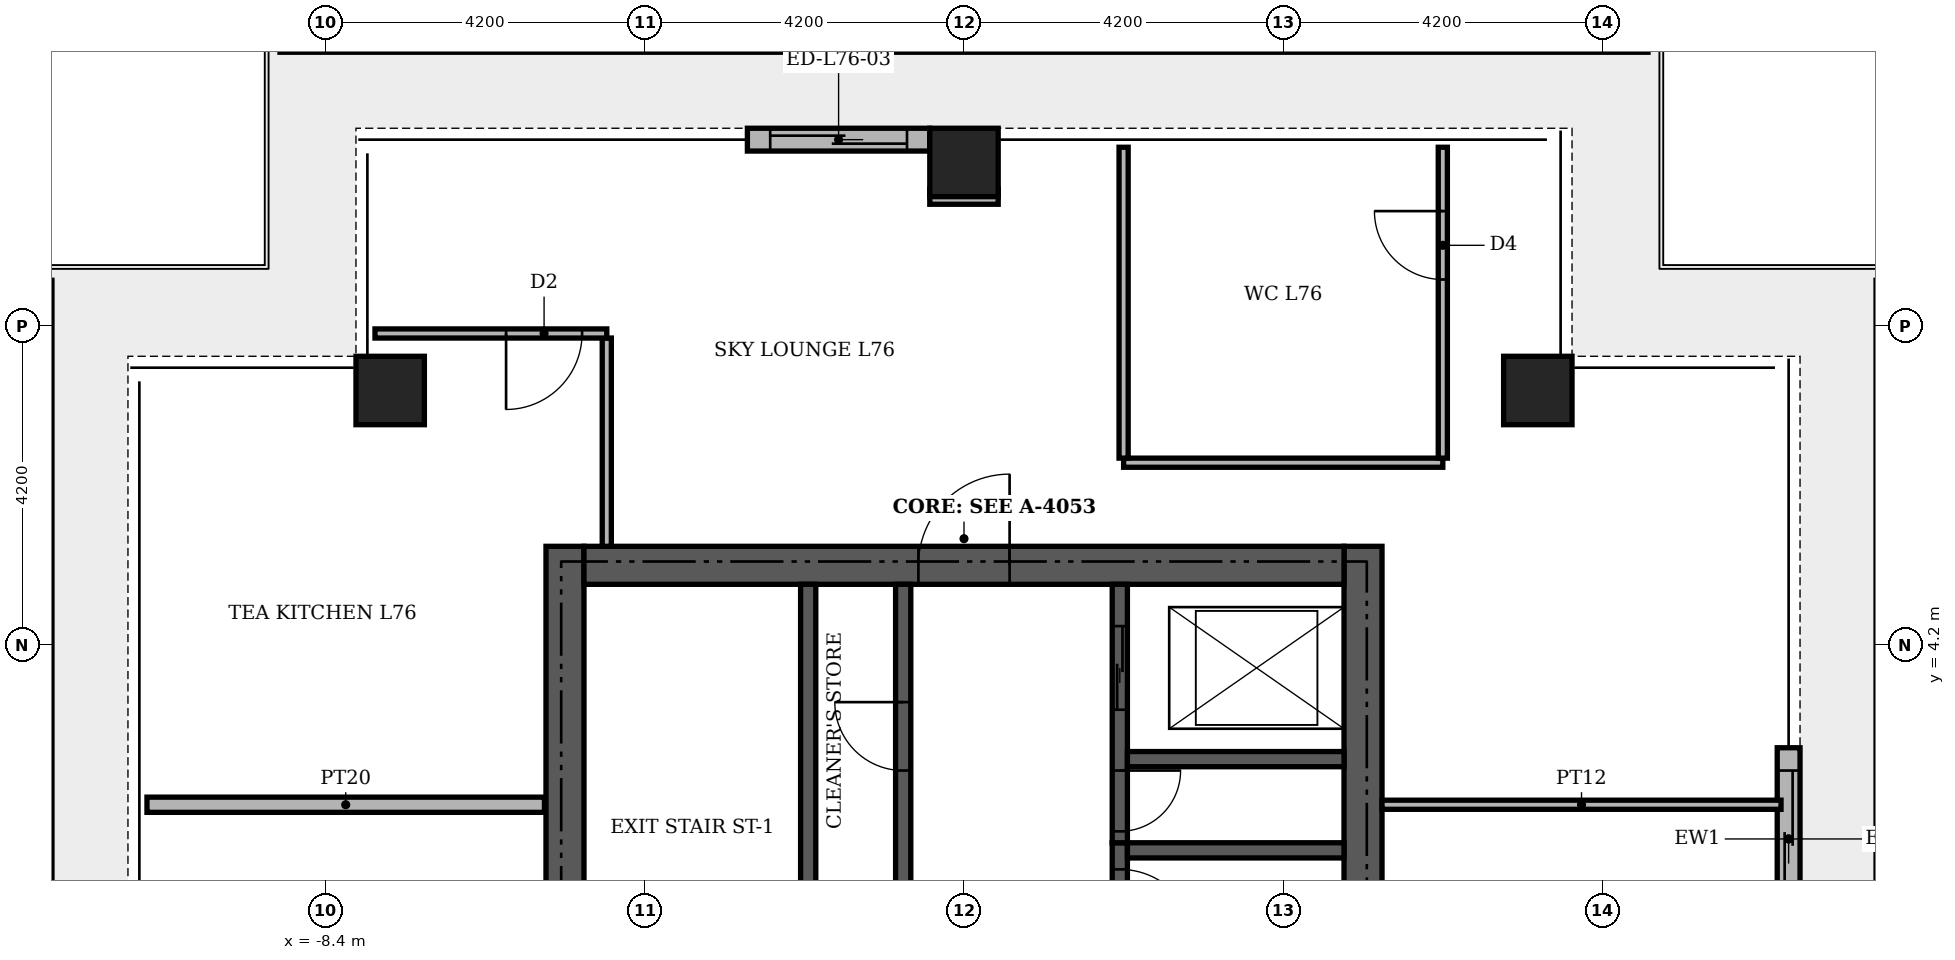
"""IFC4 building model, lengths in metres.
Left out: names, types, materials, properties, quantities, classifications, styles, units other than length and angle.
Written with IfcOpenShell. Run it as: python <this file> out.ifc"""

import sys

from ifc_helpers import new_model, si_unit, direction, frame, frame_2d, origin, origin_2d, place, context, subcontext, project, spatial, rectangle, extrude, element, fill, save


model = new_model("IFC4")
c1 = context("Model", 3, precision=1e-05, world=origin(), true_north=direction((0.0, 1.0)))
c2 = subcontext(c1, "Body", "Model", "MODEL_VIEW")
j1 = project(units=[si_unit("LENGTHUNIT", "METRE"), si_unit("PLANEANGLEUNIT", "RADIAN")], contexts=[c1])
p1 = place(None, origin())
s1 = spatial("IfcSite", under=j1, at=p1, CompositionType="ELEMENT")
p2 = place(p1, origin())
s2 = spatial("IfcBuilding", under=s1, at=p2, CompositionType="ELEMENT")
p3 = place(p2, frame((0.0, 0.0, 316.2)))
s3 = spatial("IfcBuildingStorey", under=s2, at=p3, CompositionType="ELEMENT", Elevation=316.2)
for number, where, z_axis, x_axis in (
    (1, (-5.25, -5.0, 0.0), (0.0, 0.0, 1.0), (0.0, 1.0, 0.0)),
    (2, (5.25, -5.0, 0.0), (0.0, 0.0, 1.0), (0.0, 1.0, 0.0)),
):
    element("IfcWall", number, at=place(p3, frame(where, z_axis=z_axis, x_axis=x_axis)), inside=s3, PredefinedType="SHEAR", context=c2, shape_type="SweptSolid", body=[
        extrude(rectangle(XDim=10.5, YDim=0.5, at=frame_2d((5.25, 0.0))), origin(), (0.0, 0.0, 1.0), 5.0),
    ])
p4 = place(p3, frame((-5.0, 5.25, 0.0), z_axis=(0.0, 0.0, 1.0), x_axis=(1.0, 0.0, 0.0)))
e3 = element("IfcWall", 3, at=p4, inside=s3, PredefinedType="SHEAR", context=c2, shape_type="SweptSolid", body=[
    extrude(rectangle(XDim=10.0, YDim=0.5, at=frame_2d((5.0, 0.0))), origin(), (0.0, 0.0, 1.0), 5.0),
])
p5 = place(p4, frame((4.4, 0.0, 0.0)))
e4 = element("IfcOpeningElement", 4, at=p5, cuts=e3, PredefinedType="OPENING", context=c2, shape_type="SweptSolid", body=[
    extrude(rectangle(XDim=1.2, YDim=2.1, at=frame_2d((0.6, 1.05))), frame((0.0, 0.26, 0.0), z_axis=(0.0, -1.0, 0.0), x_axis=(1.0, 0.0, 0.0)), (0.0, 0.0, 1.0), 0.52),
])
p6 = place(p3, frame((2.05, -5.0, 0.0), z_axis=(0.0, 0.0, 1.0), x_axis=(0.0, 1.0, 0.0)))
e5 = element("IfcWall", 5, at=p6, inside=s3, PredefinedType="SHEAR", context=c2, shape_type="SweptSolid", body=[
    extrude(rectangle(XDim=6.6, YDim=0.2, at=frame_2d((3.3, 0.0))), origin(), (0.0, 0.0, 1.0), 5.0),
])
p7 = place(p6, frame((5.25, 0.0, 0.0)))
e6 = element("IfcOpeningElement", 6, at=p7, cuts=e5, PredefinedType="OPENING", context=c2, shape_type="SweptSolid", body=[
    extrude(rectangle(XDim=1.0, YDim=2.1, at=frame_2d((0.5, 1.05))), frame((0.0, 0.11, 0.0), z_axis=(0.0, -1.0, 0.0), x_axis=(1.0, 0.0, 0.0)), (0.0, 0.0, 1.0), 0.22),
])
p8 = place(p3, frame((-2.05, -1.4, 0.0), z_axis=(0.0, 0.0, 1.0), x_axis=(0.0, 1.0, 0.0)))
e7 = element("IfcWall", 7, at=p8, inside=s3, PredefinedType="SHEAR", context=c2, shape_type="SweptSolid", body=[
    extrude(rectangle(XDim=6.4, YDim=0.2, at=frame_2d((3.2, 0.0))), origin(), (0.0, 0.0, 1.0), 5.0),
])
p9 = place(p8, frame((0.15, 0.0, 0.0)))
e8 = element("IfcOpeningElement", 8, at=p9, cuts=e7, PredefinedType="OPENING", context=c2, shape_type="SweptSolid", body=[
    extrude(rectangle(XDim=1.0, YDim=2.1, at=frame_2d((0.5, 1.05))), frame((0.0, 0.11, 0.0), z_axis=(0.0, -1.0, 0.0), x_axis=(1.0, 0.0, 0.0)), (0.0, 0.0, 1.0), 0.22),
])
p10 = place(p3, frame((2.15, 1.5, 0.0), z_axis=(0.0, 0.0, 1.0), x_axis=(1.0, 0.0, 0.0)))
e9 = element("IfcWall", 9, at=p10, inside=s3, PredefinedType="SHEAR", context=c2, shape_type="SweptSolid", body=[
    extrude(rectangle(XDim=2.85, YDim=0.2, at=frame_2d((1.425, 0.0))), origin(), (0.0, 0.0, 1.0), 5.0),
])
p11 = place(p3, frame((-0.8, 1.0, 0.0), z_axis=(0.0, 0.0, 1.0), x_axis=(0.0, 1.0, 0.0)))
e10 = element("IfcWall", 10, at=p11, inside=s3, PredefinedType="SHEAR", context=c2, shape_type="SweptSolid", body=[
    extrude(rectangle(XDim=4.0, YDim=0.2, at=frame_2d((2.0, 0.0))), origin(), (0.0, 0.0, 1.0), 5.0),
])
p12 = place(p11, frame((1.55, 0.0, 0.0)))
e11 = element("IfcOpeningElement", 11, at=p12, cuts=e10, PredefinedType="OPENING", context=c2, shape_type="SweptSolid", body=[
    extrude(rectangle(XDim=0.9, YDim=2.1, at=frame_2d((0.45, 1.05))), frame((0.0, 0.11, 0.0), z_axis=(0.0, -1.0, 0.0), x_axis=(1.0, 0.0, 0.0)), (0.0, 0.0, 1.0), 0.22),
])
p13 = place(p3, frame((2.05, 1.6, 0.0), z_axis=(0.0, 0.0, 1.0), x_axis=(0.0, 1.0, 0.0)))
e12 = element("IfcWall", 12, at=p13, inside=s3, PredefinedType="SHEAR", context=c2, shape_type="SweptSolid", body=[
    extrude(rectangle(XDim=3.4, YDim=0.2, at=frame_2d((1.7, 0.0))), origin(), (0.0, 0.0, 1.0), 5.0),
])
p14 = place(p13, frame((1.75, 0.0, 0.0)))
e13 = element("IfcOpeningElement", 13, at=p14, cuts=e12, PredefinedType="OPENING", context=c2, shape_type="SweptSolid", body=[
    extrude(rectangle(XDim=1.1, YDim=2.1, at=frame_2d((0.55, 1.05))), frame((0.0, 0.11, 0.0), z_axis=(0.0, -1.0, 0.0), x_axis=(1.0, 0.0, 0.0)), (0.0, 0.0, 1.0), 0.22),
])
p15 = place(p13, frame((0.15, 0.0, 0.0)))
e14 = element("IfcOpeningElement", 14, at=p15, cuts=e12, PredefinedType="OPENING", context=c2, shape_type="SweptSolid", body=[
    extrude(rectangle(XDim=0.8, YDim=2.1, at=frame_2d((0.4, 1.05))), frame((0.0, 0.11, 0.0), z_axis=(0.0, -1.0, 0.0), x_axis=(1.0, 0.0, 0.0)), (0.0, 0.0, 1.0), 0.22),
])
p16 = place(p3, frame((2.15, 2.7, 0.0), z_axis=(0.0, 0.0, 1.0), x_axis=(1.0, 0.0, 0.0)))
e15 = element("IfcWall", 15, at=p16, inside=s3, PredefinedType="SHEAR", context=c2, shape_type="SweptSolid", body=[
    extrude(rectangle(XDim=2.85, YDim=0.2, at=frame_2d((1.425, 0.0))), origin(), (0.0, 0.0, 1.0), 5.0),
])
for number, where, z_axis, x_axis in (
    (16, (7.55, 7.55, -0.35), (0.0, 0.0, 1.0), (1.0, 0.0, 0.0)),
    (17, (0.0, 10.55, -0.35), (0.0, 0.0, 1.0), (1.0, 0.0, 0.0)),
    (18, (-7.55, 7.55, -0.35), (0.0, 0.0, 1.0), (1.0, 0.0, 0.0)),
):
    element("IfcColumn", number, at=place(p3, frame(where, z_axis=z_axis, x_axis=x_axis)), inside=s3, PredefinedType="COLUMN", context=c2, shape_type="SweptSolid", body=[
        extrude(rectangle(XDim=0.9, YDim=0.9, at=origin_2d()), origin(), (0.0, 0.0, 1.0), 5.75),
    ])
p17 = place(p3, frame((10.85, 0.45, 0.0), z_axis=(0.0, 0.0, 1.0), x_axis=(0.0, 1.0, 0.0)))
e19 = element("IfcWall", 19, at=p17, inside=s3, PredefinedType="STANDARD", context=c2, shape_type="SweptSolid", body=[
    extrude(rectangle(XDim=2.4, YDim=0.3, at=frame_2d((1.2, 0.0))), origin(), (0.0, 0.0, 1.0), 5.0),
])
p18 = place(p17, frame((0.3, 0.0, 0.0)))
e20 = element("IfcOpeningElement", 20, at=p18, cuts=e19, PredefinedType="OPENING", context=c2, shape_type="SweptSolid", body=[
    extrude(rectangle(XDim=1.8, YDim=2.4, at=frame_2d((0.9, 1.2))), frame((0.0, 0.16, 0.0), z_axis=(0.0, -1.0, 0.0), x_axis=(1.0, 0.0, 0.0)), (0.0, 0.0, 1.0), 0.32),
])
p19 = place(p3, frame((-0.45, 10.85, 0.0), z_axis=(0.0, 0.0, 1.0), x_axis=(-1.0, 0.0, 0.0)))
e21 = element("IfcWall", 21, at=p19, inside=s3, PredefinedType="STANDARD", context=c2, shape_type="SweptSolid", body=[
    extrude(rectangle(XDim=2.4, YDim=0.3, at=frame_2d((1.2, 0.0))), origin(), (0.0, 0.0, 1.0), 5.0),
])
p20 = place(p19, frame((0.3, 0.0, 0.0)))
e22 = element("IfcOpeningElement", 22, at=p20, cuts=e21, PredefinedType="OPENING", context=c2, shape_type="SweptSolid", body=[
    extrude(rectangle(XDim=1.8, YDim=2.4, at=frame_2d((0.9, 1.2))), frame((0.0, 0.16, 0.0), z_axis=(0.0, -1.0, 0.0), x_axis=(1.0, 0.0, 0.0)), (0.0, 0.0, 1.0), 0.32),
])
p21 = place(p3, frame((-10.75, 2.1, 0.0), z_axis=(0.0, 0.0, 1.0), x_axis=(1.0, 0.0, 0.0)))
e23 = element("IfcWall", 23, at=p21, inside=s3, PredefinedType="PARTITIONING", context=c2, shape_type="SweptSolid", body=[
    extrude(rectangle(XDim=5.23, YDim=0.2, at=frame_2d((2.615, 0.0))), origin(), (0.0, 0.0, 1.0), 5.0),
])
p22 = place(p3, frame((5.5, 2.1, 0.0), z_axis=(0.0, 0.0, 1.0), x_axis=(1.0, 0.0, 0.0)))
e24 = element("IfcWall", 24, at=p22, inside=s3, PredefinedType="PARTITIONING", context=c2, shape_type="SweptSolid", body=[
    extrude(rectangle(XDim=5.25, YDim=0.12, at=frame_2d((2.625, 0.0))), origin(), (0.0, 0.0, 1.0), 5.0),
])
p23 = place(p3, frame((-4.7, 5.5, 0.0), z_axis=(0.0, 0.0, 1.0), x_axis=(0.0, 1.0, 0.0)))
e25 = element("IfcWall", 25, at=p23, inside=s3, PredefinedType="PARTITIONING", context=c2, shape_type="SweptSolid", body=[
    extrude(rectangle(XDim=2.74, YDim=0.12, at=frame_2d((1.37, 0.0))), origin(), (0.0, 0.0, 1.0), 5.0),
])
p24 = place(p3, frame((2.1, 6.6, 0.0), z_axis=(0.0, 0.0, 1.0), x_axis=(1.0, 0.0, 0.0)))
e26 = element("IfcWall", 26, at=p24, inside=s3, PredefinedType="PARTITIONING", context=c2, shape_type="SweptSolid", body=[
    extrude(rectangle(XDim=4.2, YDim=0.12, at=frame_2d((2.1, 0.0))), origin(), (0.0, 0.0, 1.0), 5.0),
])
p25 = place(p3, frame((2.1, 6.66, 0.0), z_axis=(0.0, 0.0, 1.0), x_axis=(0.0, 1.0, 0.0)))
e27 = element("IfcWall", 27, at=p25, inside=s3, PredefinedType="PARTITIONING", context=c2, shape_type="SweptSolid", body=[
    extrude(rectangle(XDim=4.09, YDim=0.12, at=frame_2d((2.045, 0.0))), origin(), (0.0, 0.0, 1.0), 5.0),
])
p26 = place(p3, frame((6.3, 6.66, 0.0), z_axis=(0.0, 0.0, 1.0), x_axis=(0.0, 1.0, 0.0)))
e28 = element("IfcWall", 28, at=p26, inside=s3, PredefinedType="PARTITIONING", context=c2, shape_type="SweptSolid", body=[
    extrude(rectangle(XDim=4.09, YDim=0.12, at=frame_2d((2.045, 0.0))), origin(), (0.0, 0.0, 1.0), 5.0),
])
p27 = place(p26, frame((2.35, 0.0, 0.0)))
e29 = element("IfcOpeningElement", 29, at=p27, cuts=e28, PredefinedType="OPENING", context=c2, shape_type="SweptSolid", body=[
    extrude(rectangle(XDim=0.9, YDim=2.1, at=frame_2d((0.45, 1.05))), frame((0.0, 0.07, 0.0), z_axis=(0.0, -1.0, 0.0), x_axis=(1.0, 0.0, 0.0)), (0.0, 0.0, 1.0), 0.14),
])
p28 = place(p3, frame((-7.75, 8.3, 0.0), z_axis=(0.0, 0.0, 1.0), x_axis=(1.0, 0.0, 0.0)))
e30 = element("IfcWall", 30, at=p28, inside=s3, PredefinedType="PARTITIONING", context=c2, shape_type="SweptSolid", body=[
    extrude(rectangle(XDim=3.05, YDim=0.12, at=frame_2d((1.525, 0.0))), origin(), (0.0, 0.0, 1.0), 5.0),
])
p29 = place(p28, frame((1.725, 0.0, 0.0)))
e31 = element("IfcOpeningElement", 31, at=p29, cuts=e30, PredefinedType="OPENING", context=c2, shape_type="SweptSolid", body=[
    extrude(rectangle(XDim=1.0, YDim=2.1, at=frame_2d((0.5, 1.05))), frame((0.0, 0.07, 0.0), z_axis=(0.0, -1.0, 0.0), x_axis=(1.0, 0.0, 0.0)), (0.0, 0.0, 1.0), 0.14),
])
p30 = place(p3, frame((-0.45, 10.1, 0.0), z_axis=(0.0, 0.0, 1.0), x_axis=(1.0, 0.0, 0.0)))
e32 = element("IfcWall", 32, at=p30, inside=s3, PredefinedType="PARTITIONING", context=c2, shape_type="SweptSolid", body=[
    extrude(rectangle(XDim=0.9, YDim=0.2, at=frame_2d((0.45, 0.0))), origin(), (0.0, 0.0, 1.0), 5.0),
])
p31 = place(p18, origin())
e33 = element("IfcDoor", 33, at=p31, inside=s3, OperationType="SLIDING_TO_LEFT", PredefinedType="DOOR", context=c2, shape_type="SweptSolid", body=[
    extrude(rectangle(XDim=1.8, YDim=2.4, at=frame_2d((0.9, 1.2))), frame((0.0, 0.025, 0.0), z_axis=(0.0, -1.0, 0.0), x_axis=(1.0, 0.0, 0.0)), (0.0, 0.0, 1.0), 0.05),
])
fill(e20, e33)
p32 = place(p20, origin())
e34 = element("IfcDoor", 34, at=p32, inside=s3, OperationType="SLIDING_TO_LEFT", PredefinedType="DOOR", context=c2, shape_type="SweptSolid", body=[
    extrude(rectangle(XDim=1.8, YDim=2.4, at=frame_2d((0.9, 1.2))), frame((0.0, 0.025, 0.0), z_axis=(0.0, -1.0, 0.0), x_axis=(1.0, 0.0, 0.0)), (0.0, 0.0, 1.0), 0.05),
])
fill(e22, e34)
p33 = place(p14, origin())
e35 = element("IfcDoor", 35, at=p33, inside=s3, OperationType="SLIDING_TO_LEFT", PredefinedType="DOOR", context=c2, shape_type="SweptSolid", body=[
    extrude(rectangle(XDim=1.1, YDim=2.1, at=frame_2d((0.55, 1.05))), frame((0.0, 0.025, 0.0), z_axis=(0.0, -1.0, 0.0), x_axis=(1.0, 0.0, 0.0)), (0.0, 0.0, 1.0), 0.05),
])
fill(e13, e35)
p34 = place(p7, frame((1.0, 0.0, 0.0), z_axis=(0.0, 0.0, 1.0), x_axis=(-1.0, 0.0, 0.0)))
e36 = element("IfcDoor", 36, at=p34, inside=s3, OperationType="SINGLE_SWING_LEFT", PredefinedType="DOOR", context=c2, shape_type="SweptSolid", body=[
    extrude(rectangle(XDim=1.0, YDim=2.1, at=frame_2d((0.5, 1.05))), frame((0.0, 0.025, 0.0), z_axis=(0.0, -1.0, 0.0), x_axis=(1.0, 0.0, 0.0)), (0.0, 0.0, 1.0), 0.05),
])
fill(e6, e36)
p35 = place(p15, frame((0.8, 0.0, 0.0), z_axis=(0.0, 0.0, 1.0), x_axis=(-1.0, 0.0, 0.0)))
e37 = element("IfcDoor", 37, at=p35, inside=s3, OperationType="SINGLE_SWING_RIGHT", PredefinedType="DOOR", context=c2, shape_type="SweptSolid", body=[
    extrude(rectangle(XDim=0.8, YDim=2.1, at=frame_2d((0.4, 1.05))), frame((0.0, 0.025, 0.0), z_axis=(0.0, -1.0, 0.0), x_axis=(1.0, 0.0, 0.0)), (0.0, 0.0, 1.0), 0.05),
])
fill(e14, e37)
p36 = place(p12, origin())
e38 = element("IfcDoor", 38, at=p36, inside=s3, OperationType="SINGLE_SWING_RIGHT", PredefinedType="DOOR", context=c2, shape_type="SweptSolid", body=[
    extrude(rectangle(XDim=0.9, YDim=2.1, at=frame_2d((0.45, 1.05))), frame((0.0, 0.025, 0.0), z_axis=(0.0, -1.0, 0.0), x_axis=(1.0, 0.0, 0.0)), (0.0, 0.0, 1.0), 0.05),
])
fill(e11, e38)
p37 = place(p5, origin())
e39 = element("IfcDoor", 39, at=p37, inside=s3, OperationType="SINGLE_SWING_RIGHT", PredefinedType="DOOR", context=c2, shape_type="SweptSolid", body=[
    extrude(rectangle(XDim=1.2, YDim=2.1, at=frame_2d((0.6, 1.05))), frame((0.0, 0.025, 0.0), z_axis=(0.0, -1.0, 0.0), x_axis=(1.0, 0.0, 0.0)), (0.0, 0.0, 1.0), 0.05),
])
fill(e4, e39)
p38 = place(p29, frame((1.0, 0.0, 0.0), z_axis=(0.0, 0.0, 1.0), x_axis=(-1.0, 0.0, 0.0)))
e40 = element("IfcDoor", 40, at=p38, inside=s3, OperationType="SINGLE_SWING_LEFT", PredefinedType="DOOR", context=c2, shape_type="SweptSolid", body=[
    extrude(rectangle(XDim=1.0, YDim=2.1, at=frame_2d((0.5, 1.05))), frame((0.0, 0.025, 0.0), z_axis=(0.0, -1.0, 0.0), x_axis=(1.0, 0.0, 0.0)), (0.0, 0.0, 1.0), 0.05),
])
fill(e31, e40)
p39 = place(p27, origin())
e41 = element("IfcDoor", 41, at=p39, inside=s3, OperationType="SINGLE_SWING_RIGHT", PredefinedType="DOOR", context=c2, shape_type="SweptSolid", body=[
    extrude(rectangle(XDim=0.9, YDim=2.1, at=frame_2d((0.45, 1.05))), frame((0.0, 0.025, 0.0), z_axis=(0.0, -1.0, 0.0), x_axis=(1.0, 0.0, 0.0)), (0.0, 0.0, 1.0), 0.05),
])
fill(e29, e41)
save(model, sys.argv[1])
